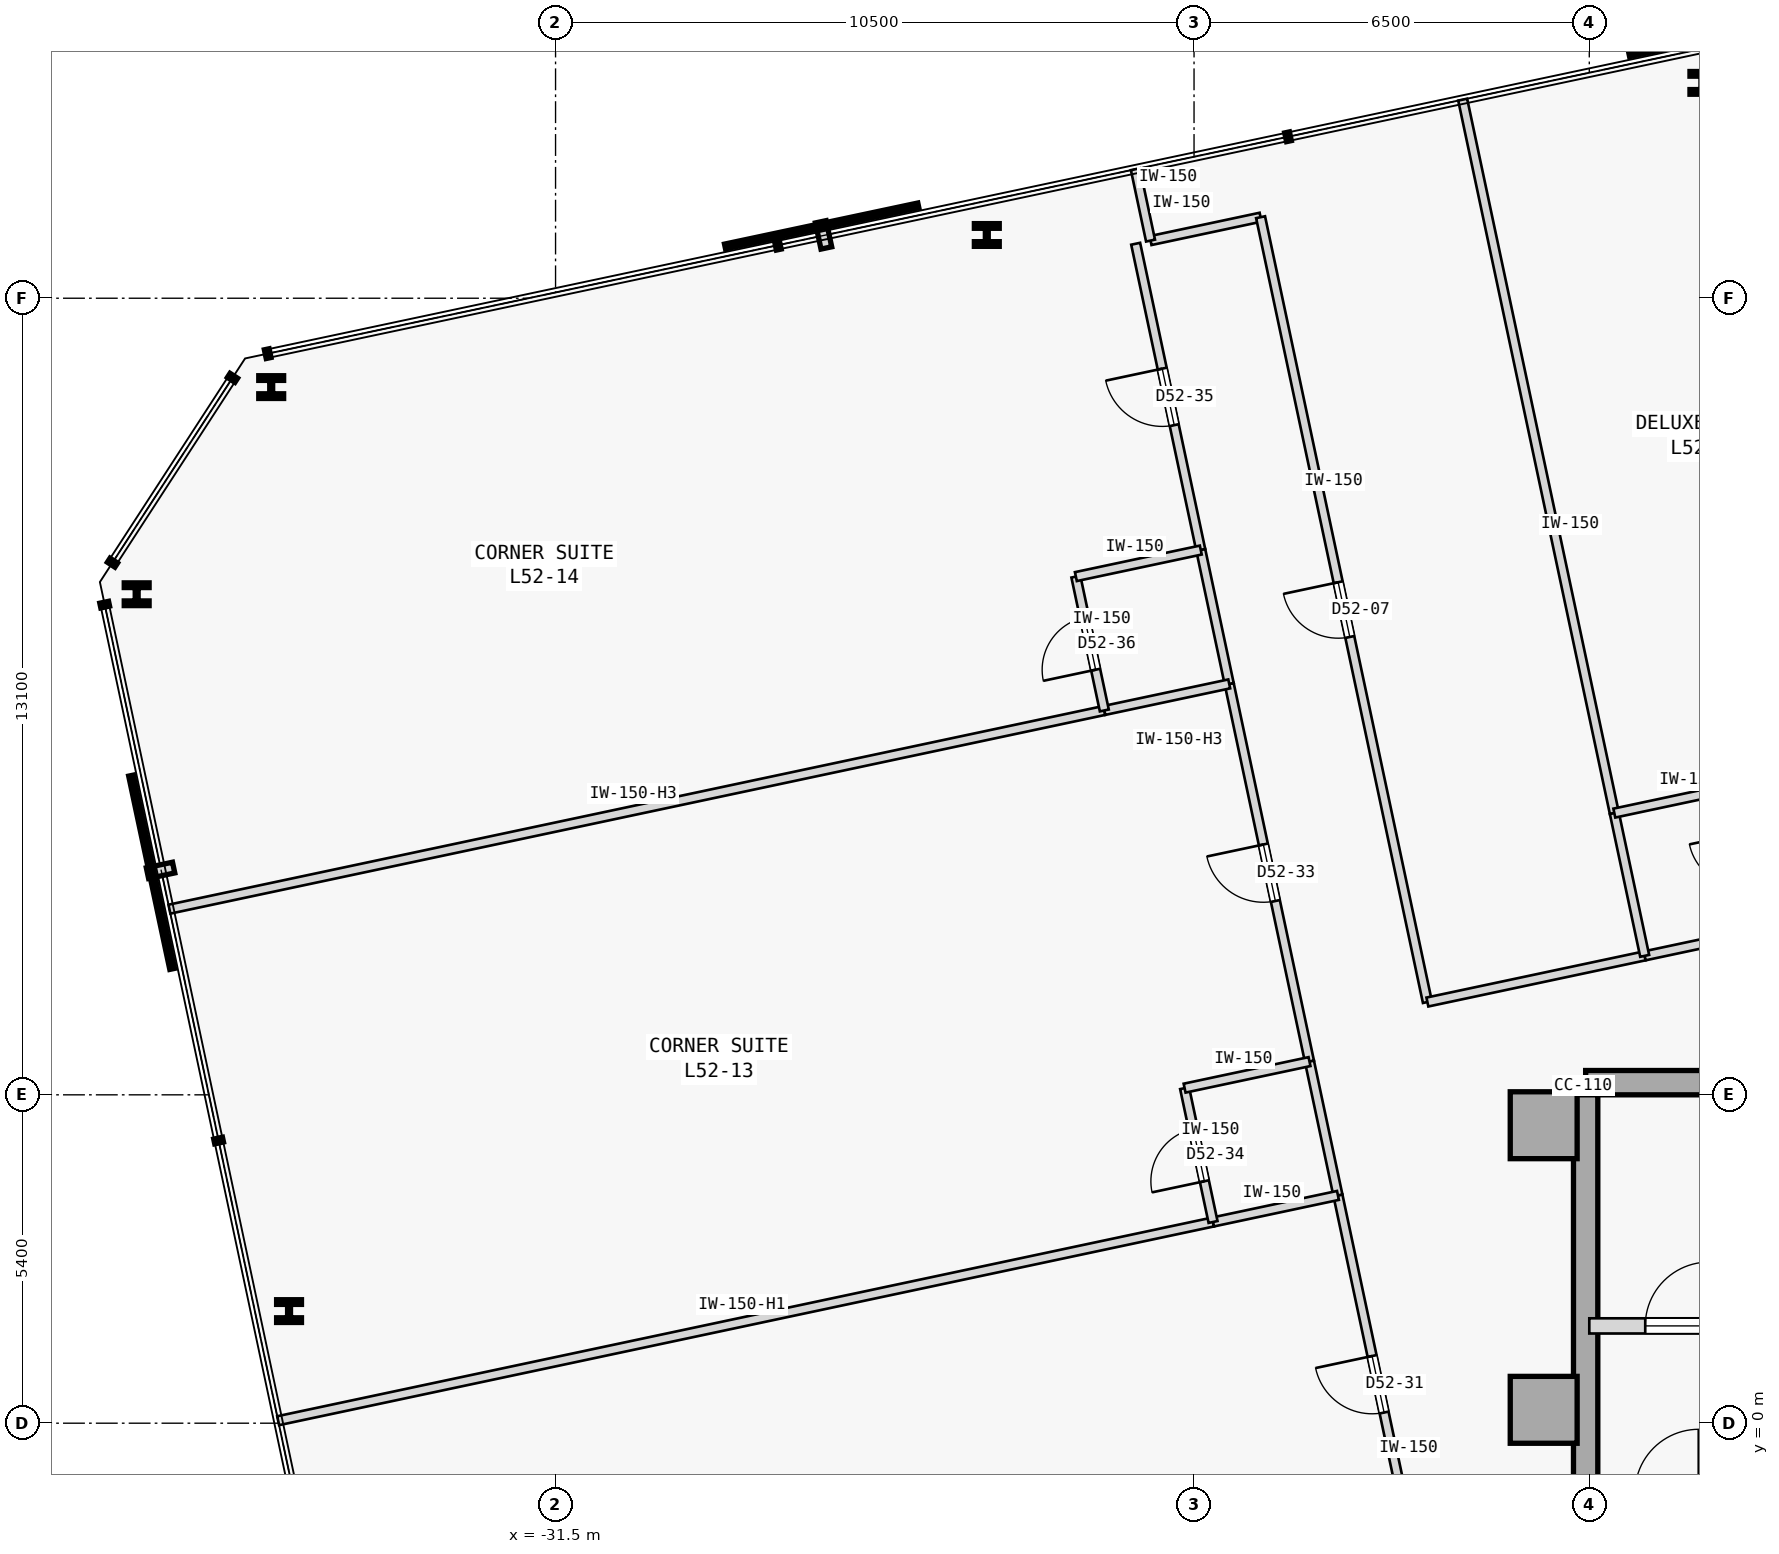
"""IFC4 building model, lengths in metres.
Left out: names, types, materials, properties, quantities, classifications, styles, units other than length and angle.
Written with IfcOpenShell. Run it as: python <this file> out.ifc"""

import sys

from ifc_helpers import new_model, si_unit, direction, frame, frame_2d, origin, origin_2d, place, context, subcontext, project, spatial, rectangle, i_section, extrude, element, fill, save


model = new_model("IFC4")
c1 = context("Model", 3, precision=1e-05, world=origin(), true_north=direction((0.0, 1.0)))
c2 = subcontext(c1, "Body", "Model", "MODEL_VIEW")
j1 = project(units=[si_unit("LENGTHUNIT", "METRE"), si_unit("PLANEANGLEUNIT", "RADIAN")], contexts=[c1])
p1 = place(None, origin())
s1 = spatial("IfcSite", under=j1, at=p1, CompositionType="ELEMENT")
p2 = place(p1, origin())
s2 = spatial("IfcBuilding", under=s1, at=p2, CompositionType="ELEMENT")
p3 = place(p2, frame((0.0, 0.0, 199.0)))
s3 = spatial("IfcBuildingStorey", under=s2, at=p3, CompositionType="ELEMENT", Elevation=199.0)
for number, where, z_axis, x_axis in (
    (1, (-15.25, 4.9, 0.0), (0.0, 0.0, 1.0), (1.0, 0.0, 0.0)),
    (2, (-15.25, 0.22, 0.0), (0.0, 0.0, 1.0), (1.0, 0.0, 0.0)),
):
    element("IfcColumn", number, at=place(p3, frame(where, z_axis=z_axis, x_axis=x_axis)), inside=s3, PredefinedType="COLUMN", context=c2, shape_type="SweptSolid", body=[
        extrude(rectangle(XDim=1.1, YDim=1.1, at=origin_2d()), origin(), (0.0, 0.0, 1.0), 3.4),
    ])
p4 = place(p3, frame((-14.56, 5.6, 0.0), z_axis=(0.0, 0.0, 1.0), x_axis=(1.0, 0.0, 0.0)))
e3 = element("IfcWall", 3, at=p4, inside=s3, PredefinedType="SHEAR", context=c2, shape_type="SweptSolid", body=[
    extrude(rectangle(XDim=11.41, YDim=0.4, at=frame_2d((5.705, 0.0))), origin(), (0.0, 0.0, 1.0), 3.0),
])
p5 = place(p3, frame((-14.56, -5.4, 0.0), z_axis=(0.0, 0.0, 1.0), x_axis=(0.0, 1.0, 0.0)))
e4 = element("IfcWall", 4, at=p5, inside=s3, PredefinedType="SHEAR", context=c2, shape_type="SweptSolid", body=[
    extrude(rectangle(XDim=10.8, YDim=0.4, at=frame_2d((5.4, 0.0))), origin(), (0.0, 0.0, 1.0), 3.0),
])
for number, where, z_axis, x_axis in (
    (5, (-12.64, 22.042, 0.0), (0.0, 0.0, 1.0), (1.0, 0.0, 0.0)),
    (6, (-24.408, 19.54, 0.0), (0.0, 0.0, 1.0), (1.0, 0.0, 0.0)),
    (7, (-36.176, 17.039, 0.0), (0.0, 0.0, 1.0), (1.0, 0.0, 0.0)),
    (8, (-38.389, 13.632, 0.0), (0.0, 0.0, 1.0), (1.0, 0.0, 0.0)),
    (9, (-35.883, 1.844, 0.0), (0.0, 0.0, 1.0), (1.0, 0.0, 0.0)),
):
    element("IfcColumn", number, at=place(p3, frame(where, z_axis=z_axis, x_axis=x_axis)), inside=s3, PredefinedType="COLUMN", context=c2, shape_type="SweptSolid", body=[
        extrude(i_section(OverallWidth=0.409, OverallDepth=0.374, WebThickness=0.048, FlangeThickness=0.077, FilletRadius=0.015, at=origin_2d()), origin(), (0.0, 0.0, 1.0), 3.4),
    ])
p6 = place(p3, frame((-14.5, 1.6, 0.0), z_axis=(0.0, 0.0, 1.0), x_axis=(1.0, 0.0, 0.0)))
e10 = element("IfcWall", 10, at=p6, inside=s3, PredefinedType="STANDARD", context=c2, shape_type="SweptSolid", body=[
    extrude(rectangle(XDim=3.6, YDim=0.25, at=frame_2d((1.8, 0.0))), origin(), (0.0, 0.0, 1.0), 3.0),
])
p7 = place(p6, frame((0.92, 0.0, 0.0)))
e11 = element("IfcOpeningElement", 11, at=p7, cuts=e10, PredefinedType="OPENING", context=c2, shape_type="SweptSolid", body=[
    extrude(rectangle(XDim=1.05, YDim=2.15, at=frame_2d((0.525, 1.075))), frame((0.0, 0.135, 0.0), z_axis=(0.0, -1.0, 0.0), x_axis=(1.0, 0.0, 0.0)), (0.0, 0.0, 1.0), 0.27),
])
p8 = place(p3, frame((-21.715, 19.448, 0.0), z_axis=(0.0, 0.0, 1.0), x_axis=(0.978160192495, 0.207852442415, 0.0)))
e12 = element("IfcWall", 12, at=p8, inside=s3, PredefinedType="PARTITIONING", context=c2, shape_type="SweptSolid", body=[
    extrude(rectangle(XDim=1.85, YDim=0.15, at=frame_2d((0.925, 0.0))), origin(), (0.0, 0.0, 1.0), 3.0),
])
p9 = place(p3, frame((-17.162, 6.926, 0.0), z_axis=(0.0, 0.0, 1.0), x_axis=(-0.207911421929, 0.978147657888, 0.0)))
e13 = element("IfcWall", 13, at=p9, inside=s3, PredefinedType="PARTITIONING", context=c2, shape_type="SweptSolid", body=[
    extrude(rectangle(XDim=13.195, YDim=0.15, at=frame_2d((6.598, 0.0))), origin(), (0.0, 0.0, 1.0), 3.0),
])
p10 = place(p9, frame((6.137, 0.0, 0.0)))
e14 = element("IfcOpeningElement", 14, at=p10, cuts=e13, PredefinedType="OPENING", context=c2, shape_type="SweptSolid", body=[
    extrude(rectangle(XDim=0.92, YDim=2.15, at=frame_2d((0.46, 1.075))), frame((0.0, 0.085, 0.0), z_axis=(0.0, -1.0, 0.0), x_axis=(1.0, 0.0, 0.0)), (0.0, 0.0, 1.0), 0.17),
])
p11 = place(p3, frame((-17.162, 6.926, 0.0), z_axis=(0.0, 0.0, 1.0), x_axis=(0.978147299501, 0.207913108004, 0.0)))
e15 = element("IfcWall", 15, at=p11, inside=s3, PredefinedType="PARTITIONING", context=c2, shape_type="SweptSolid", body=[
    extrude(rectangle(XDim=3.653, YDim=0.15, at=frame_2d((1.827, 0.0))), origin(), (0.0, 0.0, 1.0), 3.0),
])
p12 = place(p3, frame((-13.589, 7.685, 0.0), z_axis=(0.0, 0.0, 1.0), x_axis=(0.97811873796, 0.208047433175, 0.0)))
e16 = element("IfcWall", 16, at=p12, inside=s3, PredefinedType="PARTITIONING", context=c2, shape_type="SweptSolid", body=[
    extrude(rectangle(XDim=1.981, YDim=0.15, at=frame_2d((0.99, 0.0))), origin(), (0.0, 0.0, 1.0), 3.0),
])
p13 = place(p3, frame((-17.313, -2.466, 0.0), z_axis=(0.0, 0.0, 1.0), x_axis=(-0.207916691923, 0.978146537703, 0.0)))
e17 = element("IfcWall", 17, at=p13, inside=s3, PredefinedType="PARTITIONING", context=c2, shape_type="SweptSolid", body=[
    extrude(rectangle(XDim=6.35, YDim=0.15, at=frame_2d((3.175, 0.0))), origin(), (0.0, 0.0, 1.0), 3.0),
])
p14 = place(p13, frame((2.7, 0.0, 0.0)))
e18 = element("IfcOpeningElement", 18, at=p14, cuts=e17, PredefinedType="OPENING", context=c2, shape_type="SweptSolid", body=[
    extrude(rectangle(XDim=0.95, YDim=2.15, at=frame_2d((0.475, 1.075))), frame((0.0, 0.085, 0.0), z_axis=(0.0, -1.0, 0.0), x_axis=(1.0, 0.0, 0.0)), (0.0, 0.0, 1.0), 0.17),
])
p15 = place(p3, frame((-19.101, 5.946, 0.0), z_axis=(0.0, 0.0, 1.0), x_axis=(-0.207916691923, 0.978146537703, 0.0)))
e19 = element("IfcWall", 19, at=p15, inside=s3, PredefinedType="PARTITIONING", context=c2, shape_type="SweptSolid", body=[
    extrude(rectangle(XDim=6.35, YDim=0.15, at=frame_2d((3.175, 0.0))), origin(), (0.0, 0.0, 1.0), 3.0),
])
p16 = place(p15, frame((2.7, 0.0, 0.0)))
e20 = element("IfcOpeningElement", 20, at=p16, cuts=e19, PredefinedType="OPENING", context=c2, shape_type="SweptSolid", body=[
    extrude(rectangle(XDim=0.95, YDim=2.15, at=frame_2d((0.475, 1.075))), frame((0.0, 0.085, 0.0), z_axis=(0.0, -1.0, 0.0), x_axis=(1.0, 0.0, 0.0)), (0.0, 0.0, 1.0), 0.17),
])
p17 = place(p3, frame((-18.633, 3.746, 0.0), z_axis=(0.0, 0.0, 1.0), x_axis=(-0.207913264065, 0.978147266328, 0.0)))
e21 = element("IfcWall", 21, at=p17, inside=s3, PredefinedType="PARTITIONING", context=c2, shape_type="SweptSolid", body=[
    extrude(rectangle(XDim=2.25, YDim=0.15, at=frame_2d((1.125, 0.0))), origin(), (0.0, 0.0, 1.0), 3.0),
])
p18 = place(p3, frame((-20.889, 14.358, 0.0), z_axis=(0.0, 0.0, 1.0), x_axis=(-0.207916584961, 0.978146560439, 0.0)))
e22 = element("IfcWall", 22, at=p18, inside=s3, PredefinedType="PARTITIONING", context=c2, shape_type="SweptSolid", body=[
    extrude(rectangle(XDim=5.15, YDim=0.15, at=frame_2d((2.575, 0.0))), origin(), (0.0, 0.0, 1.0), 3.0),
])
p19 = place(p18, frame((2.1, 0.0, 0.0)))
e23 = element("IfcOpeningElement", 23, at=p19, cuts=e22, PredefinedType="OPENING", context=c2, shape_type="SweptSolid", body=[
    extrude(rectangle(XDim=0.95, YDim=2.15, at=frame_2d((0.475, 1.075))), frame((0.0, 0.085, 0.0), z_axis=(0.0, -1.0, 0.0), x_axis=(1.0, 0.0, 0.0)), (0.0, 0.0, 1.0), 0.17),
])
p20 = place(p3, frame((-20.421, 12.158, 0.0), z_axis=(0.0, 0.0, 1.0), x_axis=(-0.207913264065, 0.978147266328, 0.0)))
e24 = element("IfcWall", 24, at=p20, inside=s3, PredefinedType="PARTITIONING", context=c2, shape_type="SweptSolid", body=[
    extrude(rectangle(XDim=2.25, YDim=0.15, at=frame_2d((1.125, 0.0))), origin(), (0.0, 0.0, 1.0), 3.0),
])
p21 = place(p3, frame((-14.088, 10.033, 0.0), z_axis=(0.0, 0.0, 1.0), x_axis=(-0.207910848762, 0.978147779718, 0.0)))
e25 = element("IfcWall", 25, at=p21, inside=s3, PredefinedType="PARTITIONING", context=c2, shape_type="SweptSolid", body=[
    extrude(rectangle(XDim=11.995, YDim=0.15, at=frame_2d((5.998, 0.0))), origin(), (0.0, 0.0, 1.0), 3.0),
])
p22 = place(p3, frame((-13.589, 7.685, 0.0), z_axis=(0.0, 0.0, 1.0), x_axis=(-0.207917150959, 0.978146440129, 0.0)))
e26 = element("IfcWall", 26, at=p22, inside=s3, PredefinedType="PARTITIONING", context=c2, shape_type="SweptSolid", body=[
    extrude(rectangle(XDim=2.4, YDim=0.15, at=frame_2d((1.2, 0.0))), origin(), (0.0, 0.0, 1.0), 3.0),
])
p23 = place(p3, frame((-21.715, 19.448, 0.0), z_axis=(0.0, 0.0, 1.0), x_axis=(-0.20795853359, 0.978137642823, 0.0)))
e27 = element("IfcWall", 27, at=p23, inside=s3, PredefinedType="PARTITIONING", context=c2, shape_type="SweptSolid", body=[
    extrude(rectangle(XDim=1.2, YDim=0.15, at=frame_2d((0.6, 0.0))), origin(), (0.0, 0.0, 1.0), 3.0),
])
p24 = place(p3, frame((-14.088, 10.033, 0.0), z_axis=(0.0, 0.0, 1.0), x_axis=(0.978149140323, 0.20790444749, 0.0)))
e28 = element("IfcWall", 28, at=p24, inside=s3, PredefinedType="PARTITIONING", context=c2, shape_type="SweptSolid", body=[
    extrude(rectangle(XDim=1.981, YDim=0.15, at=frame_2d((0.99, 0.0))), origin(), (0.0, 0.0, 1.0), 3.0),
])
p25 = place(p3, frame((-36.062, 0.041, 0.0), z_axis=(0.0, 0.0, 1.0), x_axis=(0.978149296727, 0.207903711638, 0.0)))
e29 = element("IfcWall", 29, at=p25, inside=s3, PredefinedType="PARTITIONING", context=c2, shape_type="SweptSolid", body=[
    extrude(rectangle(XDim=15.718, YDim=0.15, at=frame_2d((7.859, 0.0))), origin(), (0.0, 0.0, 1.0), 2.55),
])
p26 = place(p3, frame((-20.688, 3.309, 0.0), z_axis=(0.0, 0.0, 1.0), x_axis=(0.978134617382, 0.207972763311, 0.0)))
e30 = element("IfcWall", 30, at=p26, inside=s3, PredefinedType="PARTITIONING", context=c2, shape_type="SweptSolid", body=[
    extrude(rectangle(XDim=2.1, YDim=0.15, at=frame_2d((1.05, 0.0))), origin(), (0.0, 0.0, 1.0), 3.0),
])
p27 = place(p3, frame((-20.688, 3.309, 0.0), z_axis=(0.0, 0.0, 1.0), x_axis=(-0.207891197838, 0.978151956427, 0.0)))
e31 = element("IfcWall", 31, at=p27, inside=s3, PredefinedType="PARTITIONING", context=c2, shape_type="SweptSolid", body=[
    extrude(rectangle(XDim=2.25, YDim=0.15, at=frame_2d((1.125, 0.0))), origin(), (0.0, 0.0, 1.0), 3.0),
])
p28 = place(p27, frame((0.685, 0.0, 0.0)))
e32 = element("IfcOpeningElement", 32, at=p28, cuts=e31, PredefinedType="OPENING", context=c2, shape_type="SweptSolid", body=[
    extrude(rectangle(XDim=0.88, YDim=2.15, at=frame_2d((0.44, 1.075))), frame((0.0, 0.085, 0.0), z_axis=(0.0, -1.0, 0.0), x_axis=(1.0, 0.0, 0.0)), (0.0, 0.0, 1.0), 0.17),
])
p29 = place(p3, frame((-21.155, 5.51, 0.0), z_axis=(0.0, 0.0, 1.0), x_axis=(0.97815826, 0.207861536591, 0.0)))
e33 = element("IfcWall", 33, at=p29, inside=s3, PredefinedType="PARTITIONING", context=c2, shape_type="SweptSolid", body=[
    extrude(rectangle(XDim=2.1, YDim=0.15, at=frame_2d((1.05, 0.0))), origin(), (0.0, 0.0, 1.0), 3.0),
])
p30 = place(p3, frame((-37.85, 8.453, 0.0), z_axis=(0.0, 0.0, 1.0), x_axis=(0.978149296727, 0.207903711638, 0.0)))
e34 = element("IfcWall", 34, at=p30, inside=s3, PredefinedType="PARTITIONING", context=c2, shape_type="SweptSolid", body=[
    extrude(rectangle(XDim=15.718, YDim=0.15, at=frame_2d((7.859, 0.0))), origin(), (0.0, 0.0, 1.0), 2.22),
])
p31 = place(p3, frame((-22.476, 11.721, 0.0), z_axis=(0.0, 0.0, 1.0), x_axis=(0.978134617382, 0.207972763311, 0.0)))
e35 = element("IfcWall", 35, at=p31, inside=s3, PredefinedType="PARTITIONING", context=c2, shape_type="SweptSolid", body=[
    extrude(rectangle(XDim=2.1, YDim=0.15, at=frame_2d((1.05, 0.0))), origin(), (0.0, 0.0, 1.0), 2.22),
])
p32 = place(p3, frame((-22.476, 11.721, 0.0), z_axis=(0.0, 0.0, 1.0), x_axis=(-0.207891197838, 0.978151956427, 0.0)))
e36 = element("IfcWall", 36, at=p32, inside=s3, PredefinedType="PARTITIONING", context=c2, shape_type="SweptSolid", body=[
    extrude(rectangle(XDim=2.25, YDim=0.15, at=frame_2d((1.125, 0.0))), origin(), (0.0, 0.0, 1.0), 3.0),
])
p33 = place(p32, frame((0.685, 0.0, 0.0)))
e37 = element("IfcOpeningElement", 37, at=p33, cuts=e36, PredefinedType="OPENING", context=c2, shape_type="SweptSolid", body=[
    extrude(rectangle(XDim=0.88, YDim=2.15, at=frame_2d((0.44, 1.075))), frame((0.0, 0.085, 0.0), z_axis=(0.0, -1.0, 0.0), x_axis=(1.0, 0.0, 0.0)), (0.0, 0.0, 1.0), 0.17),
])
p34 = place(p3, frame((-22.943, 13.922, 0.0), z_axis=(0.0, 0.0, 1.0), x_axis=(0.97815826, 0.207861536591, 0.0)))
e38 = element("IfcWall", 38, at=p34, inside=s3, PredefinedType="PARTITIONING", context=c2, shape_type="SweptSolid", body=[
    extrude(rectangle(XDim=2.1, YDim=0.15, at=frame_2d((1.05, 0.0))), origin(), (0.0, 0.0, 1.0), 3.0),
])
p35 = place(p7, origin())
e39 = element("IfcDoor", 39, at=p35, inside=s3, OperationType="SINGLE_SWING_RIGHT", PredefinedType="DOOR", context=c2, shape_type="SweptSolid", body=[
    extrude(rectangle(XDim=1.05, YDim=2.15, at=frame_2d((0.525, 1.075))), frame((0.0, 0.025, 0.0), z_axis=(0.0, -1.0, 0.0), x_axis=(1.0, 0.0, 0.0)), (0.0, 0.0, 1.0), 0.05),
])
fill(e11, e39)
p36 = place(p10, origin())
e40 = element("IfcDoor", 40, at=p36, inside=s3, OperationType="SINGLE_SWING_RIGHT", PredefinedType="DOOR", context=c2, shape_type="SweptSolid", body=[
    extrude(rectangle(XDim=0.92, YDim=2.15, at=frame_2d((0.46, 1.075))), frame((0.0, 0.025, 0.0), z_axis=(0.0, -1.0, 0.0), x_axis=(1.0, 0.0, 0.0)), (0.0, 0.0, 1.0), 0.05),
])
fill(e14, e40)
p37 = place(p14, origin())
e41 = element("IfcDoor", 41, at=p37, inside=s3, OperationType="SINGLE_SWING_RIGHT", PredefinedType="DOOR", context=c2, shape_type="SweptSolid", body=[
    extrude(rectangle(XDim=0.95, YDim=2.15, at=frame_2d((0.475, 1.075))), frame((0.0, 0.025, 0.0), z_axis=(0.0, -1.0, 0.0), x_axis=(1.0, 0.0, 0.0)), (0.0, 0.0, 1.0), 0.05),
])
fill(e18, e41)
p38 = place(p16, origin())
e42 = element("IfcDoor", 42, at=p38, inside=s3, OperationType="SINGLE_SWING_RIGHT", PredefinedType="DOOR", context=c2, shape_type="SweptSolid", body=[
    extrude(rectangle(XDim=0.95, YDim=2.15, at=frame_2d((0.475, 1.075))), frame((0.0, 0.025, 0.0), z_axis=(0.0, -1.0, 0.0), x_axis=(1.0, 0.0, 0.0)), (0.0, 0.0, 1.0), 0.05),
])
fill(e20, e42)
p39 = place(p28, origin())
e43 = element("IfcDoor", 43, at=p39, inside=s3, OperationType="SINGLE_SWING_LEFT", PredefinedType="DOOR", context=c2, shape_type="SweptSolid", body=[
    extrude(rectangle(XDim=0.88, YDim=2.15, at=frame_2d((0.44, 1.075))), frame((0.0, 0.025, 0.0), z_axis=(0.0, -1.0, 0.0), x_axis=(1.0, 0.0, 0.0)), (0.0, 0.0, 1.0), 0.05),
])
fill(e32, e43)
p40 = place(p19, origin())
e44 = element("IfcDoor", 44, at=p40, inside=s3, OperationType="SINGLE_SWING_RIGHT", PredefinedType="DOOR", context=c2, shape_type="SweptSolid", body=[
    extrude(rectangle(XDim=0.95, YDim=2.15, at=frame_2d((0.475, 1.075))), frame((0.0, 0.025, 0.0), z_axis=(0.0, -1.0, 0.0), x_axis=(1.0, 0.0, 0.0)), (0.0, 0.0, 1.0), 0.05),
])
fill(e23, e44)
p41 = place(p33, origin())
e45 = element("IfcDoor", 45, at=p41, inside=s3, OperationType="SINGLE_SWING_LEFT", PredefinedType="DOOR", context=c2, shape_type="SweptSolid", body=[
    extrude(rectangle(XDim=0.88, YDim=2.15, at=frame_2d((0.44, 1.075))), frame((0.0, 0.025, 0.0), z_axis=(0.0, -1.0, 0.0), x_axis=(1.0, 0.0, 0.0)), (0.0, 0.0, 1.0), 0.05),
])
fill(e37, e45)
save(model, sys.argv[1])
